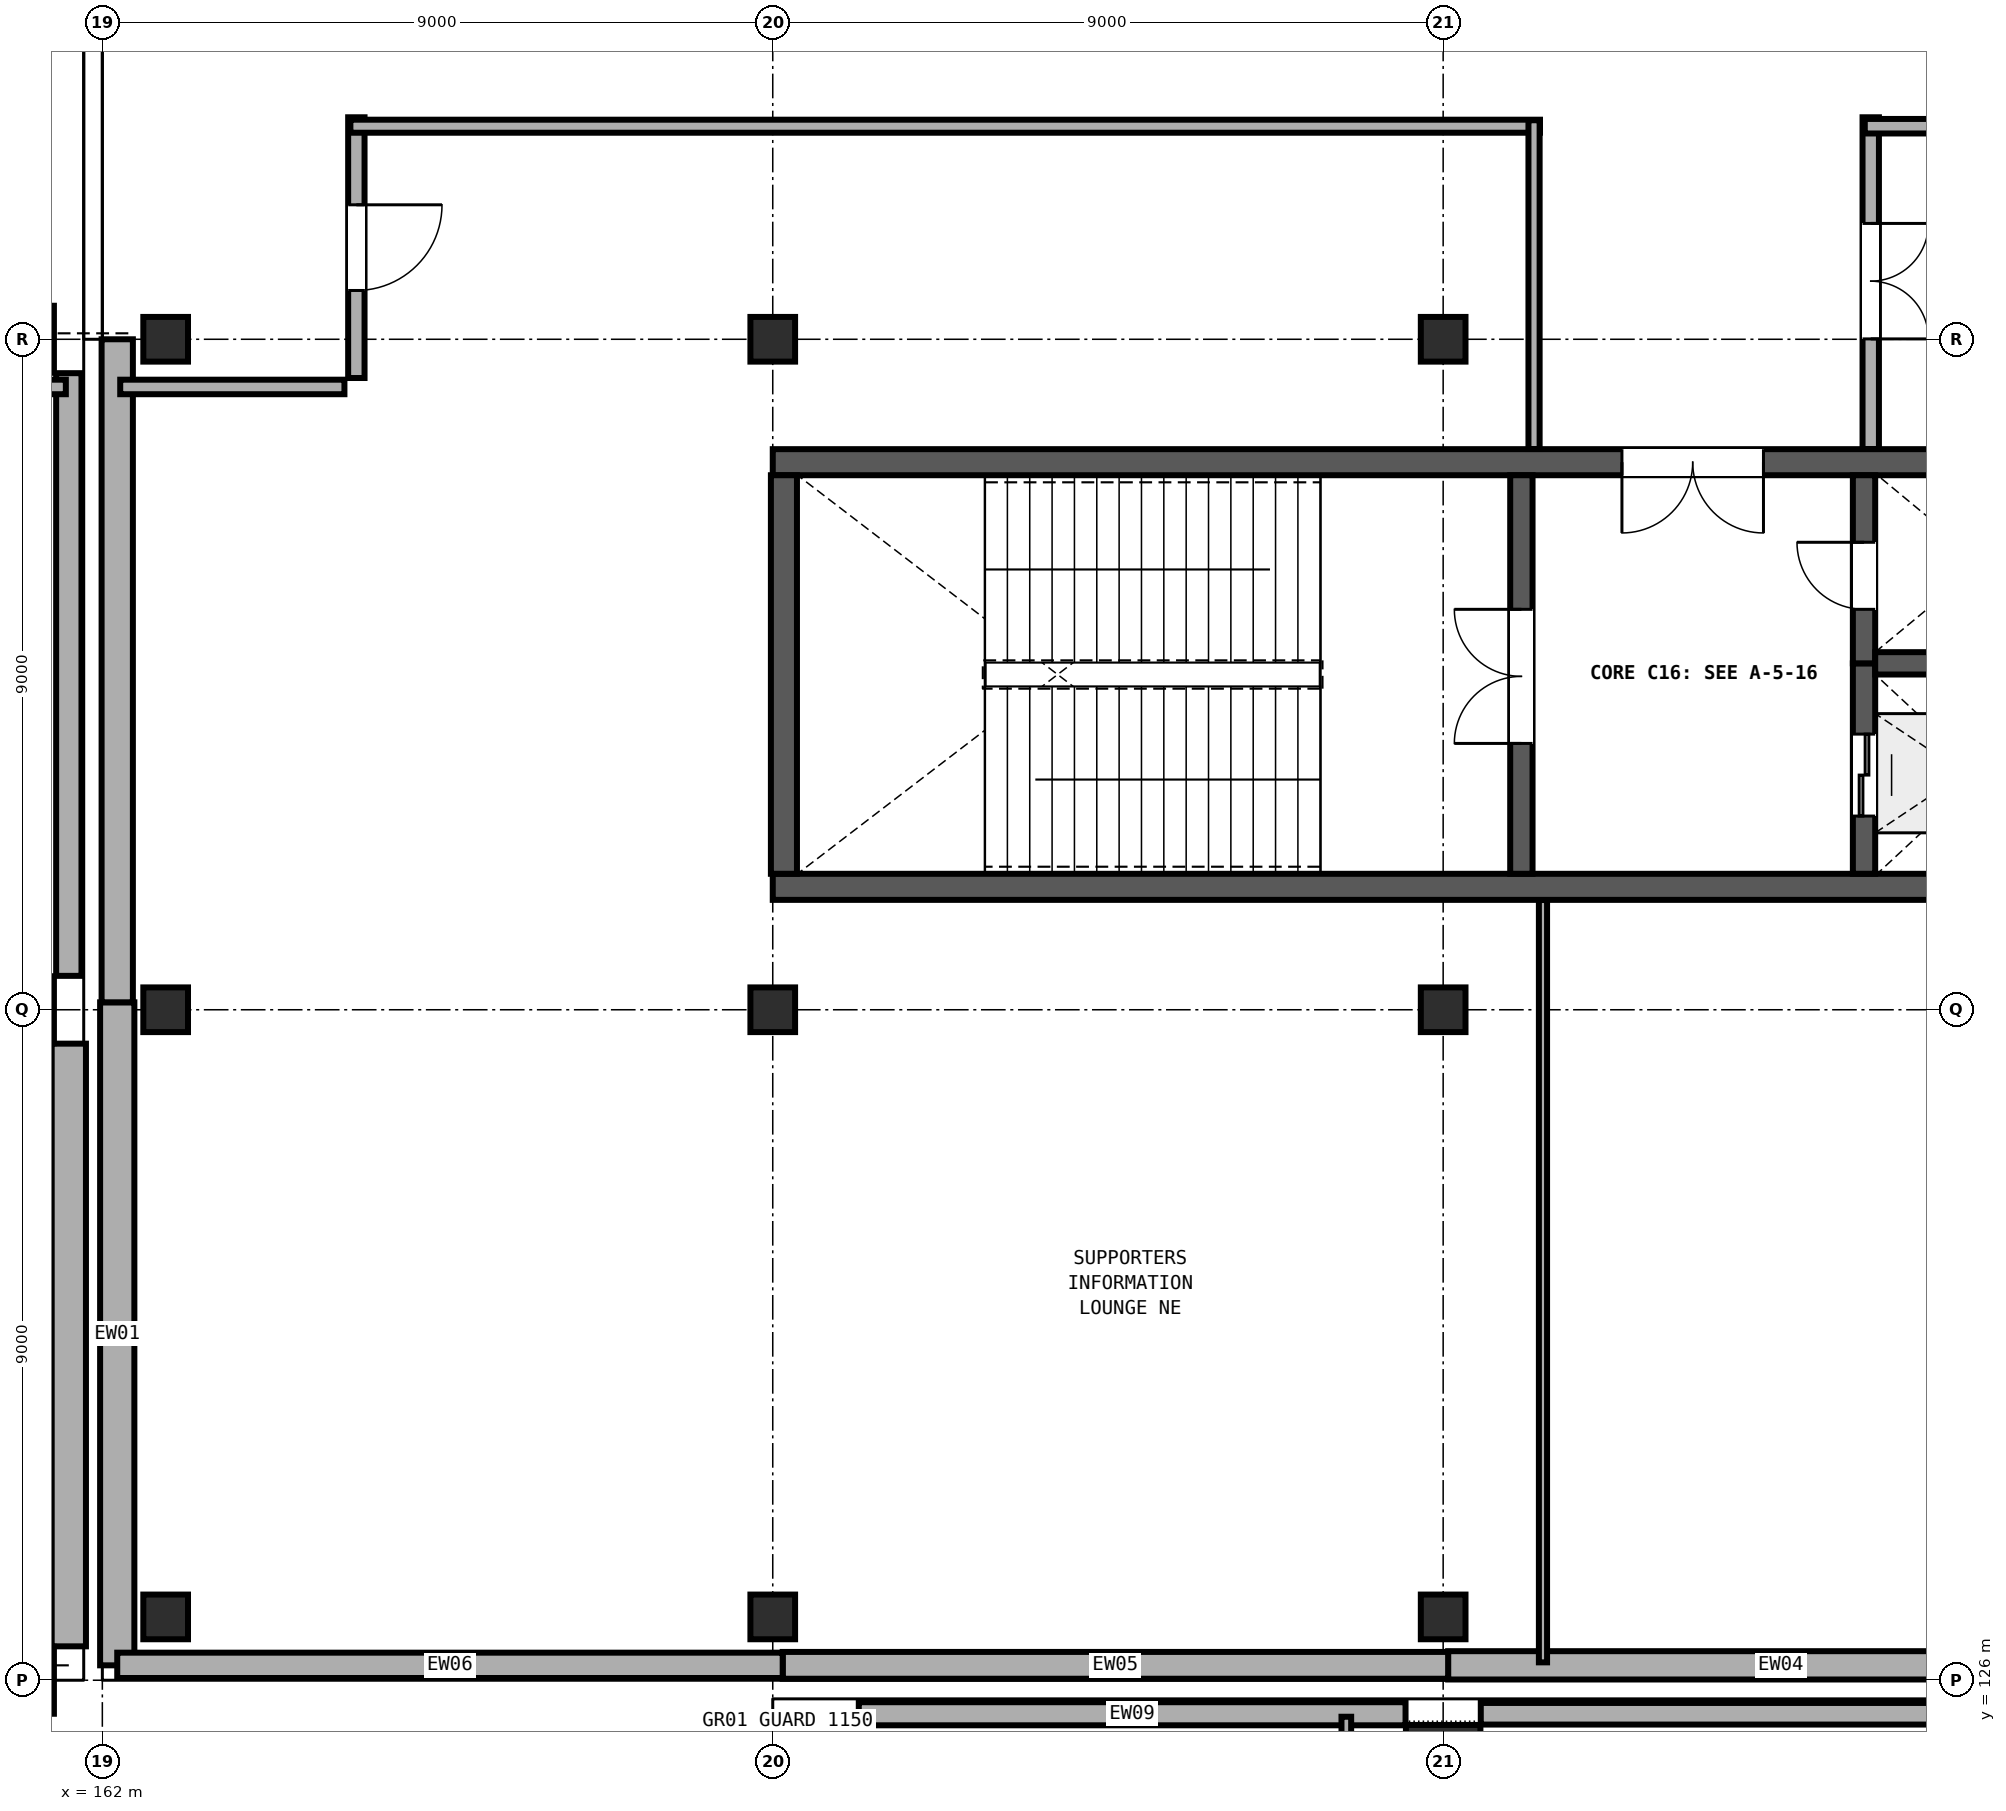
"""IFC4 building model, lengths in metres.
Left out: names, types, materials, properties, quantities, classifications, styles, units other than length and angle.
Written with IfcOpenShell. Run it as: python <this file> out.ifc"""

import sys

from ifc_helpers import new_model, si_unit, direction, frame, frame_2d, origin, origin_2d, place, context, subcontext, project, spatial, rectangle, extrude, element, fill, save


model = new_model("IFC4")
c1 = context("Model", 3, precision=1e-05, world=origin(), true_north=direction((0.0, 1.0)))
c2 = subcontext(c1, "Body", "Model", "MODEL_VIEW")
j1 = project(units=[si_unit("LENGTHUNIT", "METRE"), si_unit("PLANEANGLEUNIT", "RADIAN")], contexts=[c1])
p1 = place(None, origin())
s1 = spatial("IfcSite", under=j1, at=p1, CompositionType="ELEMENT")
p2 = place(p1, origin())
s2 = spatial("IfcBuilding", under=s1, at=p2, CompositionType="ELEMENT")
p3 = place(p2, frame((0.0, 0.0, 4.8)))
s3 = spatial("IfcBuildingStorey", under=s2, at=p3, CompositionType="ELEMENT", Elevation=4.8)
p4 = place(p3, frame((171.7, 124.9, 0.0), z_axis=(0.0, 0.0, 1.0), x_axis=(1.0, 0.0, 0.0)))
e1 = element("IfcColumn", 1, at=p4, inside=s3, PredefinedType="COLUMN", context=c2, shape_type="SweptSolid", body=[
    extrude(rectangle(XDim=0.9, YDim=0.9, at=origin_2d()), origin(), (0.0, 0.0, 1.0), 4.8),
])
p5 = place(p3, frame((180.0, 124.9, 0.0), z_axis=(0.0, 0.0, 1.0), x_axis=(1.0, 0.0, 0.0)))
e2 = element("IfcColumn", 2, at=p5, inside=s3, PredefinedType="COLUMN", context=c2, shape_type="SweptSolid", body=[
    extrude(rectangle(XDim=1.0, YDim=1.0, at=origin_2d()), origin(), (0.0, 0.0, 1.0), 4.8),
])
for number, where, z_axis, x_axis in (
    (3, (160.9, 126.0, 0.0), (0.0, 0.0, 1.0), (1.0, 0.0, 0.0)),
    (4, (160.9, 135.0, 0.0), (0.0, 0.0, 1.0), (1.0, 0.0, 0.0)),
    (5, (160.9, 144.0, 0.0), (0.0, 0.0, 1.0), (1.0, 0.0, 0.0)),
):
    element("IfcColumn", number, at=place(p3, frame(where, z_axis=z_axis, x_axis=x_axis)), inside=s3, PredefinedType="COLUMN", context=c2, shape_type="SweptSolid", body=[
        extrude(rectangle(XDim=0.9, YDim=0.9, at=origin_2d()), origin(), (0.0, 0.0, 1.0), 4.8),
    ])
for number, where, z_axis, x_axis in (
    (6, (162.85, 126.85, 0.0), (0.0, 0.0, 1.0), (1.0, 0.0, 0.0)),
    (7, (162.85, 135.0, 0.0), (0.0, 0.0, 1.0), (1.0, 0.0, 0.0)),
    (8, (162.85, 144.0, 0.0), (0.0, 0.0, 1.0), (1.0, 0.0, 0.0)),
    (9, (171.0, 126.85, 0.0), (0.0, 0.0, 1.0), (1.0, 0.0, 0.0)),
    (10, (171.0, 135.0, 0.0), (0.0, 0.0, 1.0), (1.0, 0.0, 0.0)),
    (11, (171.0, 144.0, 0.0), (0.0, 0.0, 1.0), (1.0, 0.0, 0.0)),
    (12, (180.0, 126.85, 0.0), (0.0, 0.0, 1.0), (1.0, 0.0, 0.0)),
    (13, (180.0, 135.0, 0.0), (0.0, 0.0, 1.0), (1.0, 0.0, 0.0)),
    (14, (180.0, 144.0, 0.0), (0.0, 0.0, 1.0), (1.0, 0.0, 0.0)),
):
    element("IfcColumn", number, at=place(p3, frame(where, z_axis=z_axis, x_axis=x_axis)), inside=s3, PredefinedType="COLUMN", context=c2, shape_type="SweptSolid", body=[
        extrude(rectangle(XDim=0.6, YDim=0.6, at=origin_2d()), origin(), (0.0, 0.0, 1.0), 4.8),
    ])
p6 = place(p3, frame((171.0, 136.65, 0.0), z_axis=(0.0, 0.0, 1.0), x_axis=(1.0, 0.0, 0.0)))
e15 = element("IfcWall", 15, at=p6, inside=s3, PredefinedType="SHEAR", context=c2, shape_type="SweptSolid", body=[
    extrude(rectangle(XDim=18.0, YDim=0.35, at=frame_2d((9.0, 0.0))), origin(), (0.0, 0.0, 1.0), 4.565),
])
p7 = place(p3, frame((189.0, 142.35, 0.0), z_axis=(0.0, 0.0, 1.0), x_axis=(-1.0, 0.0, 0.0)))
e16 = element("IfcWall", 16, at=p7, inside=s3, PredefinedType="SHEAR", context=c2, shape_type="SweptSolid", body=[
    extrude(rectangle(XDim=18.0, YDim=0.35, at=frame_2d((9.0, 0.0))), origin(), (0.0, 0.0, 1.0), 4.565),
])
p8 = place(p7, frame((4.7, 0.0, 0.0)))
e17 = element("IfcOpeningElement", 17, at=p8, cuts=e16, PredefinedType="OPENING", context=c2, shape_type="SweptSolid", body=[
    extrude(rectangle(XDim=1.9, YDim=2.25, at=frame_2d((0.95, 1.125))), frame((0.0, 0.185, 0.0), z_axis=(0.0, -1.0, 0.0), x_axis=(1.0, 0.0, 0.0)), (0.0, 0.0, 1.0), 0.37),
])
p9 = place(p3, frame((171.15, 142.175, 0.0), z_axis=(0.0, 0.0, 1.0), x_axis=(0.0, -1.0, 0.0)))
e18 = element("IfcWall", 18, at=p9, inside=s3, PredefinedType="SHEAR", context=c2, shape_type="SweptSolid", body=[
    extrude(rectangle(XDim=5.35, YDim=0.35, at=frame_2d((2.675, 0.0))), origin(), (0.0, 0.0, 1.0), 4.565),
])
p10 = place(p3, frame((181.05, 136.825, 0.0), z_axis=(0.0, 0.0, 1.0), x_axis=(0.0, 1.0, 0.0)))
e19 = element("IfcWall", 19, at=p10, inside=s3, PredefinedType="SHEAR", context=c2, shape_type="SweptSolid", body=[
    extrude(rectangle(XDim=5.35, YDim=0.3, at=frame_2d((2.675, 0.0))), origin(), (0.0, 0.0, 1.0), 4.565),
])
p11 = place(p10, frame((1.75, 0.0, 0.0)))
e20 = element("IfcOpeningElement", 20, at=p11, cuts=e19, PredefinedType="OPENING", context=c2, shape_type="SweptSolid", body=[
    extrude(rectangle(XDim=1.8, YDim=2.25, at=frame_2d((0.9, 1.125))), frame((0.0, 0.16, 0.0), z_axis=(0.0, -1.0, 0.0), x_axis=(1.0, 0.0, 0.0)), (0.0, 0.0, 1.0), 0.32),
])
p12 = place(p3, frame((185.65, 136.825, 0.0), z_axis=(0.0, 0.0, 1.0), x_axis=(0.0, 1.0, 0.0)))
e21 = element("IfcWall", 21, at=p12, inside=s3, PredefinedType="SHEAR", context=c2, shape_type="SweptSolid", body=[
    extrude(rectangle(XDim=2.825, YDim=0.3, at=frame_2d((1.413, 0.0))), origin(), (0.0, 0.0, 1.0), 4.565),
])
p13 = place(p12, frame((0.775, 0.0, 0.0)))
e22 = element("IfcOpeningElement", 22, at=p13, cuts=e21, PredefinedType="OPENING", context=c2, shape_type="SweptSolid", body=[
    extrude(rectangle(XDim=1.1, YDim=2.1, at=frame_2d((0.55, 1.05))), frame((0.0, 0.16, 0.0), z_axis=(0.0, -1.0, 0.0), x_axis=(1.0, 0.0, 0.0)), (0.0, 0.0, 1.0), 0.32),
])
p14 = place(p3, frame((185.65, 139.65, 0.0), z_axis=(0.0, 0.0, 1.0), x_axis=(0.0, 1.0, 0.0)))
e23 = element("IfcWall", 23, at=p14, inside=s3, PredefinedType="SHEAR", context=c2, shape_type="SweptSolid", body=[
    extrude(rectangle(XDim=2.525, YDim=0.3, at=frame_2d((1.263, 0.0))), origin(), (0.0, 0.0, 1.0), 4.565),
])
p15 = place(p14, frame((0.725, 0.0, 0.0)))
e24 = element("IfcOpeningElement", 24, at=p15, cuts=e23, PredefinedType="OPENING", context=c2, shape_type="SweptSolid", body=[
    extrude(rectangle(XDim=0.9, YDim=2.1, at=frame_2d((0.45, 1.05))), frame((0.0, 0.16, 0.0), z_axis=(0.0, -1.0, 0.0), x_axis=(1.0, 0.0, 0.0)), (0.0, 0.0, 1.0), 0.32),
])
p16 = place(p3, frame((185.8, 139.65, 0.0), z_axis=(0.0, 0.0, 1.0), x_axis=(1.0, 0.0, 0.0)))
e25 = element("IfcWall", 25, at=p16, inside=s3, PredefinedType="SHEAR", context=c2, shape_type="SweptSolid", body=[
    extrude(rectangle(XDim=2.875, YDim=0.3, at=frame_2d((1.438, 0.0))), origin(), (0.0, 0.0, 1.0), 4.565),
])
p17 = place(p3, frame((172.155, 125.55, 0.0), z_axis=(0.0, 0.0, 1.0), x_axis=(1.0, 0.0, 0.0)))
e26 = element("IfcWall", 26, at=p17, inside=s3, PredefinedType="SOLIDWALL", context=c2, shape_type="SweptSolid", body=[
    extrude(rectangle(XDim=7.34, YDim=0.31, at=frame_2d((3.67, 0.0))), origin(), (0.0, 0.0, 1.0), 3.28),
])
p18 = place(p3, frame((180.505, 125.55, 0.0), z_axis=(0.0, 0.0, 1.0), x_axis=(1.0, 0.0, 0.0)))
e27 = element("IfcWall", 27, at=p18, inside=s3, PredefinedType="SOLIDWALL", context=c2, shape_type="SweptSolid", body=[
    extrude(rectangle(XDim=8.04, YDim=0.29, at=frame_2d((4.02, 0.0))), origin(), (0.0, 0.0, 1.0), 3.28),
])
p19 = place(p3, frame((161.55, 143.545, 0.0), z_axis=(0.0, 0.0, 1.0), x_axis=(0.0, -1.0, 0.0)))
e28 = element("IfcWall", 28, at=p19, inside=s3, PredefinedType="SOLIDWALL", context=c2, shape_type="SweptSolid", body=[
    extrude(rectangle(XDim=8.09, YDim=0.34, at=frame_2d((4.045, 0.0))), origin(), (0.0, 0.0, 1.0), 3.28),
])
p20 = place(p3, frame((161.55, 134.545, 0.0), z_axis=(0.0, 0.0, 1.0), x_axis=(0.0, -1.0, 0.0)))
e29 = element("IfcWall", 29, at=p20, inside=s3, PredefinedType="SOLIDWALL", context=c2, shape_type="SweptSolid", body=[
    extrude(rectangle(XDim=8.09, YDim=0.46, at=frame_2d((4.045, 0.0))), origin(), (0.0, 0.0, 1.0), 3.28),
])
p21 = place(p3, frame((162.2, 126.2, 0.0), z_axis=(0.0, 0.0, 1.0), x_axis=(0.0, 1.0, 0.0)))
e30 = element("IfcWall", 30, at=p21, inside=s3, PredefinedType="SOLIDWALL", context=c2, shape_type="SweptSolid", body=[
    extrude(rectangle(XDim=8.9, YDim=0.46, at=frame_2d((4.45, 0.0))), origin(), (0.0, 0.0, 1.0), 3.28),
])
p22 = place(p3, frame((162.2, 135.1, 0.0), z_axis=(0.0, 0.0, 1.0), x_axis=(0.0, 1.0, 0.0)))
e31 = element("IfcWall", 31, at=p22, inside=s3, PredefinedType="SOLIDWALL", context=c2, shape_type="SweptSolid", body=[
    extrude(rectangle(XDim=8.9, YDim=0.42, at=frame_2d((4.45, 0.0))), origin(), (0.0, 0.0, 1.0), 3.28),
])
p23 = place(p3, frame((189.0, 126.2, 0.0), z_axis=(0.0, 0.0, 1.0), x_axis=(-1.0, 0.0, 0.0)))
e32 = element("IfcWall", 32, at=p23, inside=s3, PredefinedType="SOLIDWALL", context=c2, shape_type="SweptSolid", body=[
    extrude(rectangle(XDim=8.933, YDim=0.38, at=frame_2d((4.467, 0.0))), origin(), (0.0, 0.0, 1.0), 3.28),
])
p24 = place(p3, frame((180.067, 126.2, 0.0), z_axis=(0.0, 0.0, 1.0), x_axis=(-1.0, 0.0, 0.0)))
e33 = element("IfcWall", 33, at=p24, inside=s3, PredefinedType="SOLIDWALL", context=c2, shape_type="SweptSolid", body=[
    extrude(rectangle(XDim=8.933, YDim=0.36, at=frame_2d((4.467, 0.0))), origin(), (0.0, 0.0, 1.0), 3.28),
])
p25 = place(p3, frame((171.133, 126.2, 0.0), z_axis=(0.0, 0.0, 1.0), x_axis=(-1.0, 0.0, 0.0)))
e34 = element("IfcWall", 34, at=p25, inside=s3, PredefinedType="SOLIDWALL", context=c2, shape_type="SweptSolid", body=[
    extrude(rectangle(XDim=8.933, YDim=0.34, at=frame_2d((4.467, 0.0))), origin(), (0.0, 0.0, 1.0), 3.28),
])
p26 = place(p3, frame((178.7, 115.12, 0.0), z_axis=(0.0, 0.0, 1.0), x_axis=(0.0, 1.0, 0.0)))
e35 = element("IfcWall", 35, at=p26, inside=s3, PredefinedType="PARTITIONING", context=c2, shape_type="SweptSolid", body=[
    extrude(rectangle(XDim=10.39, YDim=0.13, at=frame_2d((5.195, 0.0))), origin(), (0.0, 0.0, 1.0), 3.28),
])
p27 = place(p3, frame((158.15, 143.36, 0.0), z_axis=(0.0, 0.0, 1.0), x_axis=(1.0, 0.0, 0.0)))
e36 = element("IfcWall", 36, at=p27, inside=s3, PredefinedType="PARTITIONING", context=c2, shape_type="SweptSolid", body=[
    extrude(rectangle(XDim=3.36, YDim=0.195, at=frame_2d((1.68, 0.0))), origin(), (0.0, 0.0, 1.0), 3.28),
])
p28 = place(p3, frame((185.74, 146.98, 0.0), z_axis=(0.0, 0.0, 1.0), x_axis=(0.0, -1.0, 0.0)))
e37 = element("IfcWall", 37, at=p28, inside=s3, PredefinedType="PARTITIONING", context=c2, shape_type="SweptSolid", body=[
    extrude(rectangle(XDim=4.453, YDim=0.22, at=frame_2d((2.227, 0.0))), origin(), (0.0, 0.0, 1.0), 3.28),
])
p29 = place(p28, frame((1.425, 0.0, 0.0)))
e38 = element("IfcOpeningElement", 38, at=p29, cuts=e37, PredefinedType="OPENING", context=c2, shape_type="SweptSolid", body=[
    extrude(rectangle(XDim=1.55, YDim=2.2, at=frame_2d((0.775, 1.1))), frame((0.0, 0.12, 0.0), z_axis=(0.0, -1.0, 0.0), x_axis=(1.0, 0.0, 0.0)), (0.0, 0.0, 1.0), 0.24),
])
p30 = place(p3, frame((185.66, 146.86, 0.0), z_axis=(0.0, 0.0, 1.0), x_axis=(1.0, 0.0, 0.0)))
e39 = element("IfcWall", 39, at=p30, inside=s3, PredefinedType="PARTITIONING", context=c2, shape_type="SweptSolid", body=[
    extrude(rectangle(XDim=14.78, YDim=0.195, at=frame_2d((7.39, 0.0))), origin(), (0.0, 0.0, 1.0), 3.28),
])
p31 = place(p3, frame((181.34, 126.24, 0.0), z_axis=(0.0, 0.0, 1.0), x_axis=(0.0, 1.0, 0.0)))
e40 = element("IfcWall", 40, at=p31, inside=s3, PredefinedType="PARTITIONING", context=c2, shape_type="SweptSolid", body=[
    extrude(rectangle(XDim=10.233, YDim=0.11, at=frame_2d((5.116, 0.0))), origin(), (0.0, 0.0, 1.0), 3.28),
])
p32 = place(p3, frame((165.41, 146.98, 0.0), z_axis=(0.0, 0.0, 1.0), x_axis=(0.0, -1.0, 0.0)))
e41 = element("IfcWall", 41, at=p32, inside=s3, PredefinedType="PARTITIONING", context=c2, shape_type="SweptSolid", body=[
    extrude(rectangle(XDim=3.5, YDim=0.22, at=frame_2d((1.75, 0.0))), origin(), (0.0, 0.0, 1.0), 3.28),
])
p33 = place(p32, frame((1.175, 0.0, 0.0)))
e42 = element("IfcOpeningElement", 42, at=p33, cuts=e41, PredefinedType="OPENING", context=c2, shape_type="SweptSolid", body=[
    extrude(rectangle(XDim=1.15, YDim=2.15, at=frame_2d((0.575, 1.075))), frame((0.0, 0.12, 0.0), z_axis=(0.0, -1.0, 0.0), x_axis=(1.0, 0.0, 0.0)), (0.0, 0.0, 1.0), 0.24),
])
p34 = place(p3, frame((162.24, 143.36, 0.0), z_axis=(0.0, 0.0, 1.0), x_axis=(1.0, 0.0, 0.0)))
e43 = element("IfcWall", 43, at=p34, inside=s3, PredefinedType="PARTITIONING", context=c2, shape_type="SweptSolid", body=[
    extrude(rectangle(XDim=3.01, YDim=0.195, at=frame_2d((1.505, 0.0))), origin(), (0.0, 0.0, 1.0), 3.28),
])
p35 = place(p3, frame((165.33, 146.86, 0.0), z_axis=(0.0, 0.0, 1.0), x_axis=(1.0, 0.0, 0.0)))
e44 = element("IfcWall", 44, at=p35, inside=s3, PredefinedType="PARTITIONING", context=c2, shape_type="SweptSolid", body=[
    extrude(rectangle(XDim=15.97, YDim=0.175, at=frame_2d((7.985, 0.0))), origin(), (0.0, 0.0, 1.0), 3.28),
])
p36 = place(p3, frame((181.22, 146.94, 0.0), z_axis=(0.0, 0.0, 1.0), x_axis=(0.0, -1.0, 0.0)))
e45 = element("IfcWall", 45, at=p36, inside=s3, PredefinedType="PARTITIONING", context=c2, shape_type="SweptSolid", body=[
    extrude(rectangle(XDim=4.413, YDim=0.15, at=frame_2d((2.207, 0.0))), origin(), (0.0, 0.0, 1.0), 3.28),
])
p37 = place(p11, origin())
e46 = element("IfcDoor", 46, at=p37, inside=s3, OperationType="DOUBLE_DOOR_SINGLE_SWING", PredefinedType="DOOR", context=c2, shape_type="SweptSolid", body=[
    extrude(rectangle(XDim=1.8, YDim=2.25, at=frame_2d((0.9, 1.125))), frame((0.0, 0.025, 0.0), z_axis=(0.0, -1.0, 0.0), x_axis=(1.0, 0.0, 0.0)), (0.0, 0.0, 1.0), 0.05),
])
fill(e20, e46)
p38 = place(p15, origin())
e47 = element("IfcDoor", 47, at=p38, inside=s3, OperationType="SINGLE_SWING_RIGHT", PredefinedType="DOOR", context=c2, shape_type="SweptSolid", body=[
    extrude(rectangle(XDim=0.9, YDim=2.1, at=frame_2d((0.45, 1.05))), frame((0.0, 0.025, 0.0), z_axis=(0.0, -1.0, 0.0), x_axis=(1.0, 0.0, 0.0)), (0.0, 0.0, 1.0), 0.05),
])
fill(e24, e47)
p39 = place(p13, origin())
e48 = element("IfcDoor", 48, at=p39, inside=s3, OperationType="DOUBLE_DOOR_SLIDING", PredefinedType="DOOR", context=c2, shape_type="SweptSolid", body=[
    extrude(rectangle(XDim=1.1, YDim=2.1, at=frame_2d((0.55, 1.05))), frame((0.0, 0.025, 0.0), z_axis=(0.0, -1.0, 0.0), x_axis=(1.0, 0.0, 0.0)), (0.0, 0.0, 1.0), 0.05),
])
fill(e22, e48)
p40 = place(p8, origin())
e49 = element("IfcDoor", 49, at=p40, inside=s3, OperationType="DOUBLE_DOOR_SINGLE_SWING", PredefinedType="DOOR", context=c2, shape_type="SweptSolid", body=[
    extrude(rectangle(XDim=1.9, YDim=2.25, at=frame_2d((0.95, 1.125))), frame((0.0, 0.025, 0.0), z_axis=(0.0, -1.0, 0.0), x_axis=(1.0, 0.0, 0.0)), (0.0, 0.0, 1.0), 0.05),
])
fill(e17, e49)
p41 = place(p29, origin())
e50 = element("IfcDoor", 50, at=p41, inside=s3, OperationType="DOUBLE_DOOR_SINGLE_SWING", PredefinedType="DOOR", context=c2, shape_type="SweptSolid", body=[
    extrude(rectangle(XDim=1.55, YDim=2.2, at=frame_2d((0.775, 1.1))), frame((0.0, 0.025, 0.0), z_axis=(0.0, -1.0, 0.0), x_axis=(1.0, 0.0, 0.0)), (0.0, 0.0, 1.0), 0.05),
])
fill(e38, e50)
p42 = place(p33, origin())
e51 = element("IfcDoor", 51, at=p42, inside=s3, OperationType="SINGLE_SWING_LEFT", PredefinedType="DOOR", context=c2, shape_type="SweptSolid", body=[
    extrude(rectangle(XDim=1.15, YDim=2.15, at=frame_2d((0.575, 1.075))), frame((0.0, 0.025, 0.0), z_axis=(0.0, -1.0, 0.0), x_axis=(1.0, 0.0, 0.0)), (0.0, 0.0, 1.0), 0.05),
])
fill(e42, e51)
save(model, sys.argv[1])
